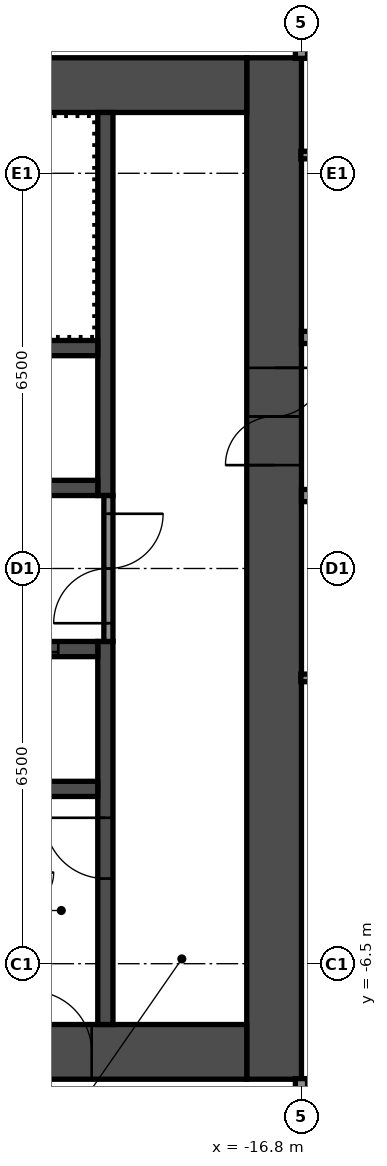
"""IFC4 building model, lengths in metres.
Left out: names, types, materials, properties, quantities, classifications, styles, units other than length and angle.
Written with IfcOpenShell. Run it as: python <this file> out.ifc"""

import sys

from ifc_helpers import new_model, si_unit, direction, frame, frame_2d, origin, place, context, subcontext, project, spatial, rectangle, extrude, element, fill, save


model = new_model("IFC4")
c1 = context("Model", 3, precision=1e-05, world=origin(), true_north=direction((0.0, 1.0)))
c2 = subcontext(c1, "Body", "Model", "MODEL_VIEW")
j1 = project(units=[si_unit("LENGTHUNIT", "METRE"), si_unit("PLANEANGLEUNIT", "RADIAN")], contexts=[c1])
p1 = place(None, origin())
s1 = spatial("IfcSite", under=j1, at=p1, CompositionType="ELEMENT")
p2 = place(p1, origin())
s2 = spatial("IfcBuilding", under=s1, at=p2, CompositionType="ELEMENT")
p3 = place(p2, frame((0.0, 0.0, 205.8)))
s3 = spatial("IfcBuildingStorey", under=s2, at=p3, CompositionType="ELEMENT", Elevation=205.8)
p4 = place(p3, frame((-17.25, -8.4, 0.0), z_axis=(0.0, 0.0, 1.0), x_axis=(0.0, 1.0, 0.0)))
e1 = element("IfcWall", 1, at=p4, inside=s3, PredefinedType="SHEAR", context=c2, shape_type="SweptSolid", body=[
    extrude(rectangle(XDim=16.8, YDim=0.9, at=frame_2d((8.4, 0.0))), origin(), (0.0, 0.0, 1.0), 2.75),
])
p5 = place(p4, frame((10.1, 0.0, 0.0)))
e2 = element("IfcOpeningElement", 2, at=p5, cuts=e1, PredefinedType="OPENING", context=c2, shape_type="SweptSolid", body=[
    extrude(rectangle(XDim=1.6, YDim=2.1, at=frame_2d((0.8, 1.05))), frame((0.0, 0.46, 0.0), z_axis=(0.0, -1.0, 0.0), x_axis=(1.0, 0.0, 0.0)), (0.0, 0.0, 1.0), 0.92),
])
p6 = place(p3, frame((-32.7, 7.95, 0.0), z_axis=(0.0, 0.0, 1.0), x_axis=(1.0, 0.0, 0.0)))
e3 = element("IfcWall", 3, at=p6, inside=s3, PredefinedType="SHEAR", context=c2, shape_type="SweptSolid", body=[
    extrude(rectangle(XDim=15.0, YDim=0.9, at=frame_2d((7.5, 0.0))), origin(), (0.0, 0.0, 1.0), 2.75),
])
p7 = place(p6, frame((3.4, 0.0, 0.0)))
e4 = element("IfcOpeningElement", 4, at=p7, cuts=e3, PredefinedType="OPENING", context=c2, shape_type="SweptSolid", body=[
    extrude(rectangle(XDim=1.2, YDim=2.1, at=frame_2d((0.6, 1.05))), frame((0.0, 0.46, 0.0), z_axis=(0.0, -1.0, 0.0), x_axis=(1.0, 0.0, 0.0)), (0.0, 0.0, 1.0), 0.92),
])
p8 = place(p6, frame((0.75, 0.0, 0.0)))
e5 = element("IfcOpeningElement", 5, at=p8, cuts=e3, PredefinedType="OPENING", context=c2, shape_type="SweptSolid", body=[
    extrude(rectangle(XDim=0.9, YDim=2.1, at=frame_2d((0.45, 1.05))), frame((0.0, 0.46, 0.0), z_axis=(0.0, -1.0, 0.0), x_axis=(1.0, 0.0, 0.0)), (0.0, 0.0, 1.0), 0.92),
])
p9 = place(p3, frame((-32.7, -7.95, 0.0), z_axis=(0.0, 0.0, 1.0), x_axis=(1.0, 0.0, 0.0)))
e6 = element("IfcWall", 6, at=p9, inside=s3, PredefinedType="SHEAR", context=c2, shape_type="SweptSolid", body=[
    extrude(rectangle(XDim=15.0, YDim=0.9, at=frame_2d((7.5, 0.0))), origin(), (0.0, 0.0, 1.0), 2.75),
])
p10 = place(p9, frame((11.45, 0.0, 0.0)))
e7 = element("IfcOpeningElement", 7, at=p10, cuts=e6, PredefinedType="OPENING", context=c2, shape_type="SweptSolid", body=[
    extrude(rectangle(XDim=1.0, YDim=2.1, at=frame_2d((0.5, 1.05))), frame((0.0, 0.46, 0.0), z_axis=(0.0, -1.0, 0.0), x_axis=(1.0, 0.0, 0.0)), (0.0, 0.0, 1.0), 0.92),
])
p11 = place(p3, frame((-20.025, 1.2, 0.0), z_axis=(0.0, 0.0, 1.0), x_axis=(0.0, 1.0, 0.0)))
e8 = element("IfcWall", 8, at=p11, inside=s3, PredefinedType="SHEAR", context=c2, shape_type="SweptSolid", body=[
    extrude(rectangle(XDim=6.3, YDim=0.25, at=frame_2d((3.15, 0.0))), origin(), (0.0, 0.0, 1.0), 2.75),
])
p12 = place(p3, frame((-20.025, -7.5, 0.0), z_axis=(0.0, 0.0, 1.0), x_axis=(0.0, 1.0, 0.0)))
e9 = element("IfcWall", 9, at=p12, inside=s3, PredefinedType="SHEAR", context=c2, shape_type="SweptSolid", body=[
    extrude(rectangle(XDim=6.3, YDim=0.25, at=frame_2d((3.15, 0.0))), origin(), (0.0, 0.0, 1.0), 2.75),
])
p13 = place(p12, frame((2.4, 0.0, 0.0)))
e10 = element("IfcOpeningElement", 10, at=p13, cuts=e9, PredefinedType="OPENING", context=c2, shape_type="SweptSolid", body=[
    extrude(rectangle(XDim=1.0, YDim=2.1, at=frame_2d((0.5, 1.05))), frame((0.0, 0.135, 0.0), z_axis=(0.0, -1.0, 0.0), x_axis=(1.0, 0.0, 0.0)), (0.0, 0.0, 1.0), 0.27),
])
p14 = place(p3, frame((-27.65, 1.325, 0.0), z_axis=(0.0, 0.0, 1.0), x_axis=(1.0, 0.0, 0.0)))
e11 = element("IfcWall", 11, at=p14, inside=s3, PredefinedType="SHEAR", context=c2, shape_type="SweptSolid", body=[
    extrude(rectangle(XDim=7.5, YDim=0.25, at=frame_2d((3.75, 0.0))), origin(), (0.0, 0.0, 1.0), 2.75),
])
p15 = place(p14, frame((4.562, 0.0, 0.0)))
e12 = element("IfcOpeningElement", 12, at=p15, cuts=e11, PredefinedType="OPENING", context=c2, shape_type="SweptSolid", body=[
    extrude(rectangle(XDim=0.9, YDim=2.1, at=frame_2d((0.45, 1.05))), frame((0.0, 0.135, 0.0), z_axis=(0.0, -1.0, 0.0), x_axis=(1.0, 0.0, 0.0)), (0.0, 0.0, 1.0), 0.27),
])
p16 = place(p14, frame((0.863, 0.0, 0.0)))
e13 = element("IfcOpeningElement", 13, at=p16, cuts=e11, PredefinedType="OPENING", context=c2, shape_type="SweptSolid", body=[
    extrude(rectangle(XDim=0.9, YDim=2.1, at=frame_2d((0.45, 1.05))), frame((0.0, 0.135, 0.0), z_axis=(0.0, -1.0, 0.0), x_axis=(1.0, 0.0, 0.0)), (0.0, 0.0, 1.0), 0.27),
])
p17 = place(p3, frame((-27.65, 3.625, 0.0), z_axis=(0.0, 0.0, 1.0), x_axis=(1.0, 0.0, 0.0)))
e14 = element("IfcWall", 14, at=p17, inside=s3, PredefinedType="SHEAR", context=c2, shape_type="SweptSolid", body=[
    extrude(rectangle(XDim=7.5, YDim=0.25, at=frame_2d((3.75, 0.0))), origin(), (0.0, 0.0, 1.0), 2.75),
])
p18 = place(p3, frame((-27.65, -1.325, 0.0), z_axis=(0.0, 0.0, 1.0), x_axis=(1.0, 0.0, 0.0)))
e15 = element("IfcWall", 15, at=p18, inside=s3, PredefinedType="SHEAR", context=c2, shape_type="SweptSolid", body=[
    extrude(rectangle(XDim=7.5, YDim=0.25, at=frame_2d((3.75, 0.0))), origin(), (0.0, 0.0, 1.0), 2.75),
])
p19 = place(p18, frame((5.75, 0.0, 0.0)))
e16 = element("IfcOpeningElement", 16, at=p19, cuts=e15, PredefinedType="OPENING", context=c2, shape_type="SweptSolid", body=[
    extrude(rectangle(XDim=1.1, YDim=2.1, at=frame_2d((0.55, 1.05))), frame((0.0, 0.135, 0.0), z_axis=(0.0, -1.0, 0.0), x_axis=(1.0, 0.0, 0.0)), (0.0, 0.0, 1.0), 0.27),
])
p20 = place(p18, frame((3.35, 0.0, 0.0)))
e17 = element("IfcOpeningElement", 17, at=p20, cuts=e15, PredefinedType="OPENING", context=c2, shape_type="SweptSolid", body=[
    extrude(rectangle(XDim=1.1, YDim=2.1, at=frame_2d((0.55, 1.05))), frame((0.0, 0.135, 0.0), z_axis=(0.0, -1.0, 0.0), x_axis=(1.0, 0.0, 0.0)), (0.0, 0.0, 1.0), 0.27),
])
p21 = place(p18, frame((0.95, 0.0, 0.0)))
e18 = element("IfcOpeningElement", 18, at=p21, cuts=e15, PredefinedType="OPENING", context=c2, shape_type="SweptSolid", body=[
    extrude(rectangle(XDim=1.1, YDim=2.1, at=frame_2d((0.55, 1.05))), frame((0.0, 0.135, 0.0), z_axis=(0.0, -1.0, 0.0), x_axis=(1.0, 0.0, 0.0)), (0.0, 0.0, 1.0), 0.27),
])
p22 = place(p3, frame((-27.65, -3.625, 0.0), z_axis=(0.0, 0.0, 1.0), x_axis=(1.0, 0.0, 0.0)))
e19 = element("IfcWall", 19, at=p22, inside=s3, PredefinedType="SHEAR", context=c2, shape_type="SweptSolid", body=[
    extrude(rectangle(XDim=7.5, YDim=0.25, at=frame_2d((3.75, 0.0))), origin(), (0.0, 0.0, 1.0), 2.75),
])
p23 = place(p3, frame((-19.975, -1.2, 0.0), z_axis=(0.0, 0.0, 1.0), x_axis=(0.0, 1.0, 0.0)))
e20 = element("IfcWall", 20, at=p23, inside=s3, PredefinedType="PARTITIONING", context=c2, shape_type="SweptSolid", body=[
    extrude(rectangle(XDim=2.4, YDim=0.15, at=frame_2d((1.2, 0.0))), origin(), (0.0, 0.0, 1.0), 2.75),
])
p24 = place(p23, frame((0.3, 0.0, 0.0)))
e21 = element("IfcOpeningElement", 21, at=p24, cuts=e20, PredefinedType="OPENING", context=c2, shape_type="SweptSolid", body=[
    extrude(rectangle(XDim=1.8, YDim=2.1, at=frame_2d((0.9, 1.05))), frame((0.0, 0.085, 0.0), z_axis=(0.0, -1.0, 0.0), x_axis=(1.0, 0.0, 0.0)), (0.0, 0.0, 1.0), 0.17),
])
p25 = place(p3, frame((-16.81, -1.8, 0.0), z_axis=(0.0, 0.0, 1.0), x_axis=(1.0, 0.0, 0.0)))
e22 = element("IfcWall", 22, at=p25, inside=s3, PredefinedType="PARTITIONING", context=c2, shape_type="SweptSolid", body=[
    extrude(rectangle(XDim=2.448, YDim=0.125, at=frame_2d((1.224, 0.0))), origin(), (0.0, 0.0, 1.0), 2.75),
])
p26 = place(p3, frame((-16.8, 1.2, 0.0), z_axis=(0.0, 0.0, 1.0), x_axis=(1.0, 0.0, 0.0)))
e23 = element("IfcWall", 23, at=p26, inside=s3, PredefinedType="PARTITIONING", context=c2, shape_type="SweptSolid", body=[
    extrude(rectangle(XDim=33.6, YDim=0.2, at=frame_2d((16.8, 0.0))), origin(), (0.0, 0.0, 1.0), 2.75),
])
p27 = place(p26, frame((2.85, 0.0, 0.0)))
e24 = element("IfcOpeningElement", 24, at=p27, cuts=e23, PredefinedType="OPENING", context=c2, shape_type="SweptSolid", body=[
    extrude(rectangle(XDim=1.0, YDim=2.1, at=frame_2d((0.5, 1.05))), frame((0.0, 0.11, 0.0), z_axis=(0.0, -1.0, 0.0), x_axis=(1.0, 0.0, 0.0)), (0.0, 0.0, 1.0), 0.22),
])
p28 = place(p26, frame((4.55, 0.0, 0.0)))
e25 = element("IfcOpeningElement", 25, at=p28, cuts=e23, PredefinedType="OPENING", context=c2, shape_type="SweptSolid", body=[
    extrude(rectangle(XDim=1.0, YDim=2.1, at=frame_2d((0.5, 1.05))), frame((0.0, 0.11, 0.0), z_axis=(0.0, -1.0, 0.0), x_axis=(1.0, 0.0, 0.0)), (0.0, 0.0, 1.0), 0.22),
])
p29 = place(p26, frame((11.25, 0.0, 0.0)))
e26 = element("IfcOpeningElement", 26, at=p29, cuts=e23, PredefinedType="OPENING", context=c2, shape_type="SweptSolid", body=[
    extrude(rectangle(XDim=1.0, YDim=2.1, at=frame_2d((0.5, 1.05))), frame((0.0, 0.11, 0.0), z_axis=(0.0, -1.0, 0.0), x_axis=(1.0, 0.0, 0.0)), (0.0, 0.0, 1.0), 0.22),
])
p30 = place(p26, frame((12.95, 0.0, 0.0)))
e27 = element("IfcOpeningElement", 27, at=p30, cuts=e23, PredefinedType="OPENING", context=c2, shape_type="SweptSolid", body=[
    extrude(rectangle(XDim=1.0, YDim=2.1, at=frame_2d((0.5, 1.05))), frame((0.0, 0.11, 0.0), z_axis=(0.0, -1.0, 0.0), x_axis=(1.0, 0.0, 0.0)), (0.0, 0.0, 1.0), 0.22),
])
p31 = place(p26, frame((20.5, 0.0, 0.0)))
e28 = element("IfcOpeningElement", 28, at=p31, cuts=e23, PredefinedType="OPENING", context=c2, shape_type="SweptSolid", body=[
    extrude(rectangle(XDim=1.0, YDim=2.1, at=frame_2d((0.5, 1.05))), frame((0.0, 0.11, 0.0), z_axis=(0.0, -1.0, 0.0), x_axis=(1.0, 0.0, 0.0)), (0.0, 0.0, 1.0), 0.22),
])
p32 = place(p26, frame((28.05, 0.0, 0.0)))
e29 = element("IfcOpeningElement", 29, at=p32, cuts=e23, PredefinedType="OPENING", context=c2, shape_type="SweptSolid", body=[
    extrude(rectangle(XDim=1.0, YDim=2.1, at=frame_2d((0.5, 1.05))), frame((0.0, 0.11, 0.0), z_axis=(0.0, -1.0, 0.0), x_axis=(1.0, 0.0, 0.0)), (0.0, 0.0, 1.0), 0.22),
])
p33 = place(p26, frame((29.75, 0.0, 0.0)))
e30 = element("IfcOpeningElement", 30, at=p33, cuts=e23, PredefinedType="OPENING", context=c2, shape_type="SweptSolid", body=[
    extrude(rectangle(XDim=1.0, YDim=2.1, at=frame_2d((0.5, 1.05))), frame((0.0, 0.11, 0.0), z_axis=(0.0, -1.0, 0.0), x_axis=(1.0, 0.0, 0.0)), (0.0, 0.0, 1.0), 0.22),
])
p34 = place(p3, frame((-16.8, 3.8, 0.0), z_axis=(0.0, 0.0, 1.0), x_axis=(1.0, 0.0, 0.0)))
e31 = element("IfcWall", 31, at=p34, inside=s3, PredefinedType="PARTITIONING", context=c2, shape_type="SweptSolid", body=[
    extrude(rectangle(XDim=33.6, YDim=0.2, at=frame_2d((16.8, 0.0))), origin(), (0.0, 0.0, 1.0), 2.75),
])
p35 = place(p34, frame((2.85, 0.0, 0.0)))
e32 = element("IfcOpeningElement", 32, at=p35, cuts=e31, PredefinedType="OPENING", context=c2, shape_type="SweptSolid", body=[
    extrude(rectangle(XDim=1.0, YDim=2.1, at=frame_2d((0.5, 1.05))), frame((0.0, 0.11, 0.0), z_axis=(0.0, -1.0, 0.0), x_axis=(1.0, 0.0, 0.0)), (0.0, 0.0, 1.0), 0.22),
])
p36 = place(p34, frame((4.55, 0.0, 0.0)))
e33 = element("IfcOpeningElement", 33, at=p36, cuts=e31, PredefinedType="OPENING", context=c2, shape_type="SweptSolid", body=[
    extrude(rectangle(XDim=1.0, YDim=2.1, at=frame_2d((0.5, 1.05))), frame((0.0, 0.11, 0.0), z_axis=(0.0, -1.0, 0.0), x_axis=(1.0, 0.0, 0.0)), (0.0, 0.0, 1.0), 0.22),
])
p37 = place(p34, frame((9.545, 0.0, 0.0)))
e34 = element("IfcOpeningElement", 34, at=p37, cuts=e31, PredefinedType="OPENING", context=c2, shape_type="SweptSolid", body=[
    extrude(rectangle(XDim=0.9, YDim=2.1, at=frame_2d((0.45, 1.05))), frame((0.0, 0.11, 0.0), z_axis=(0.0, -1.0, 0.0), x_axis=(1.0, 0.0, 0.0)), (0.0, 0.0, 1.0), 0.22),
])
p38 = place(p34, frame((13.745, 0.0, 0.0)))
e35 = element("IfcOpeningElement", 35, at=p38, cuts=e31, PredefinedType="OPENING", context=c2, shape_type="SweptSolid", body=[
    extrude(rectangle(XDim=0.9, YDim=2.1, at=frame_2d((0.45, 1.05))), frame((0.0, 0.11, 0.0), z_axis=(0.0, -1.0, 0.0), x_axis=(1.0, 0.0, 0.0)), (0.0, 0.0, 1.0), 0.22),
])
p39 = place(p34, frame((19.65, 0.0, 0.0)))
e36 = element("IfcOpeningElement", 36, at=p39, cuts=e31, PredefinedType="OPENING", context=c2, shape_type="SweptSolid", body=[
    extrude(rectangle(XDim=1.0, YDim=2.1, at=frame_2d((0.5, 1.05))), frame((0.0, 0.11, 0.0), z_axis=(0.0, -1.0, 0.0), x_axis=(1.0, 0.0, 0.0)), (0.0, 0.0, 1.0), 0.22),
])
p40 = place(p34, frame((21.35, 0.0, 0.0)))
e37 = element("IfcOpeningElement", 37, at=p40, cuts=e31, PredefinedType="OPENING", context=c2, shape_type="SweptSolid", body=[
    extrude(rectangle(XDim=1.0, YDim=2.1, at=frame_2d((0.5, 1.05))), frame((0.0, 0.11, 0.0), z_axis=(0.0, -1.0, 0.0), x_axis=(1.0, 0.0, 0.0)), (0.0, 0.0, 1.0), 0.22),
])
p41 = place(p34, frame((28.05, 0.0, 0.0)))
e38 = element("IfcOpeningElement", 38, at=p41, cuts=e31, PredefinedType="OPENING", context=c2, shape_type="SweptSolid", body=[
    extrude(rectangle(XDim=1.0, YDim=2.1, at=frame_2d((0.5, 1.05))), frame((0.0, 0.11, 0.0), z_axis=(0.0, -1.0, 0.0), x_axis=(1.0, 0.0, 0.0)), (0.0, 0.0, 1.0), 0.22),
])
p42 = place(p34, frame((29.75, 0.0, 0.0)))
e39 = element("IfcOpeningElement", 39, at=p42, cuts=e31, PredefinedType="OPENING", context=c2, shape_type="SweptSolid", body=[
    extrude(rectangle(XDim=1.0, YDim=2.1, at=frame_2d((0.5, 1.05))), frame((0.0, 0.11, 0.0), z_axis=(0.0, -1.0, 0.0), x_axis=(1.0, 0.0, 0.0)), (0.0, 0.0, 1.0), 0.22),
])
p43 = place(p3, frame((-16.81, 6.8, 0.0), z_axis=(0.0, 0.0, 1.0), x_axis=(1.0, 0.0, 0.0)))
e40 = element("IfcWall", 40, at=p43, inside=s3, PredefinedType="PARTITIONING", context=c2, shape_type="SweptSolid", body=[
    extrude(rectangle(XDim=2.448, YDim=0.125, at=frame_2d((1.224, 0.0))), origin(), (0.0, 0.0, 1.0), 2.75),
])
p44 = place(p3, frame((-16.8, -15.55, 0.0), z_axis=(0.0, 0.0, 1.0), x_axis=(0.0, 1.0, 0.0)))
e41 = element("IfcWall", 41, at=p44, inside=s3, PredefinedType="PARTITIONING", context=c2, shape_type="SweptSolid", body=[
    extrude(rectangle(XDim=7.16, YDim=0.2, at=frame_2d((3.58, 0.0))), origin(), (0.0, 0.0, 1.0), 2.75),
])
p45 = place(p3, frame((-16.8, 8.39, 0.0), z_axis=(0.0, 0.0, 1.0), x_axis=(0.0, 1.0, 0.0)))
e42 = element("IfcWall", 42, at=p45, inside=s3, PredefinedType="PARTITIONING", context=c2, shape_type="SweptSolid", body=[
    extrude(rectangle(XDim=12.16, YDim=0.2, at=frame_2d((6.08, 0.0))), origin(), (0.0, 0.0, 1.0), 2.75),
])
p46 = place(p5, origin())
e43 = element("IfcDoor", 43, at=p46, inside=s3, OperationType="DOUBLE_DOOR_SINGLE_SWING", PredefinedType="DOOR", context=c2, shape_type="SweptSolid", body=[
    extrude(rectangle(XDim=1.6, YDim=2.1, at=frame_2d((0.8, 1.05))), frame((0.0, 0.025, 0.0), z_axis=(0.0, -1.0, 0.0), x_axis=(1.0, 0.0, 0.0)), (0.0, 0.0, 1.0), 0.05),
])
fill(e2, e43)
p47 = place(p10, origin())
e44 = element("IfcDoor", 44, at=p47, inside=s3, OperationType="SINGLE_SWING_RIGHT", PredefinedType="DOOR", context=c2, shape_type="SweptSolid", body=[
    extrude(rectangle(XDim=1.0, YDim=2.1, at=frame_2d((0.5, 1.05))), frame((0.0, 0.025, 0.0), z_axis=(0.0, -1.0, 0.0), x_axis=(1.0, 0.0, 0.0)), (0.0, 0.0, 1.0), 0.05),
])
fill(e7, e44)
p48 = place(p13, origin())
e45 = element("IfcDoor", 45, at=p48, inside=s3, OperationType="SINGLE_SWING_LEFT", PredefinedType="DOOR", context=c2, shape_type="SweptSolid", body=[
    extrude(rectangle(XDim=1.0, YDim=2.1, at=frame_2d((0.5, 1.05))), frame((0.0, 0.025, 0.0), z_axis=(0.0, -1.0, 0.0), x_axis=(1.0, 0.0, 0.0)), (0.0, 0.0, 1.0), 0.05),
])
fill(e10, e45)
p49 = place(p24, origin())
e46 = element("IfcDoor", 46, at=p49, inside=s3, OperationType="DOUBLE_DOOR_SINGLE_SWING", PredefinedType="DOOR", context=c2, shape_type="SweptSolid", body=[
    extrude(rectangle(XDim=1.8, YDim=2.1, at=frame_2d((0.9, 1.05))), frame((0.0, 0.025, 0.0), z_axis=(0.0, -1.0, 0.0), x_axis=(1.0, 0.0, 0.0)), (0.0, 0.0, 1.0), 0.05),
])
fill(e21, e46)
p50 = place(p19, origin())
e47 = element("IfcDoor", 47, at=p50, inside=s3, OperationType="DOUBLE_DOOR_SLIDING", PredefinedType="DOOR", context=c2, shape_type="SweptSolid", body=[
    extrude(rectangle(XDim=1.1, YDim=2.1, at=frame_2d((0.55, 1.05))), frame((0.0, 0.025, 0.0), z_axis=(0.0, -1.0, 0.0), x_axis=(1.0, 0.0, 0.0)), (0.0, 0.0, 1.0), 0.05),
])
fill(e16, e47)
save(model, sys.argv[1])
